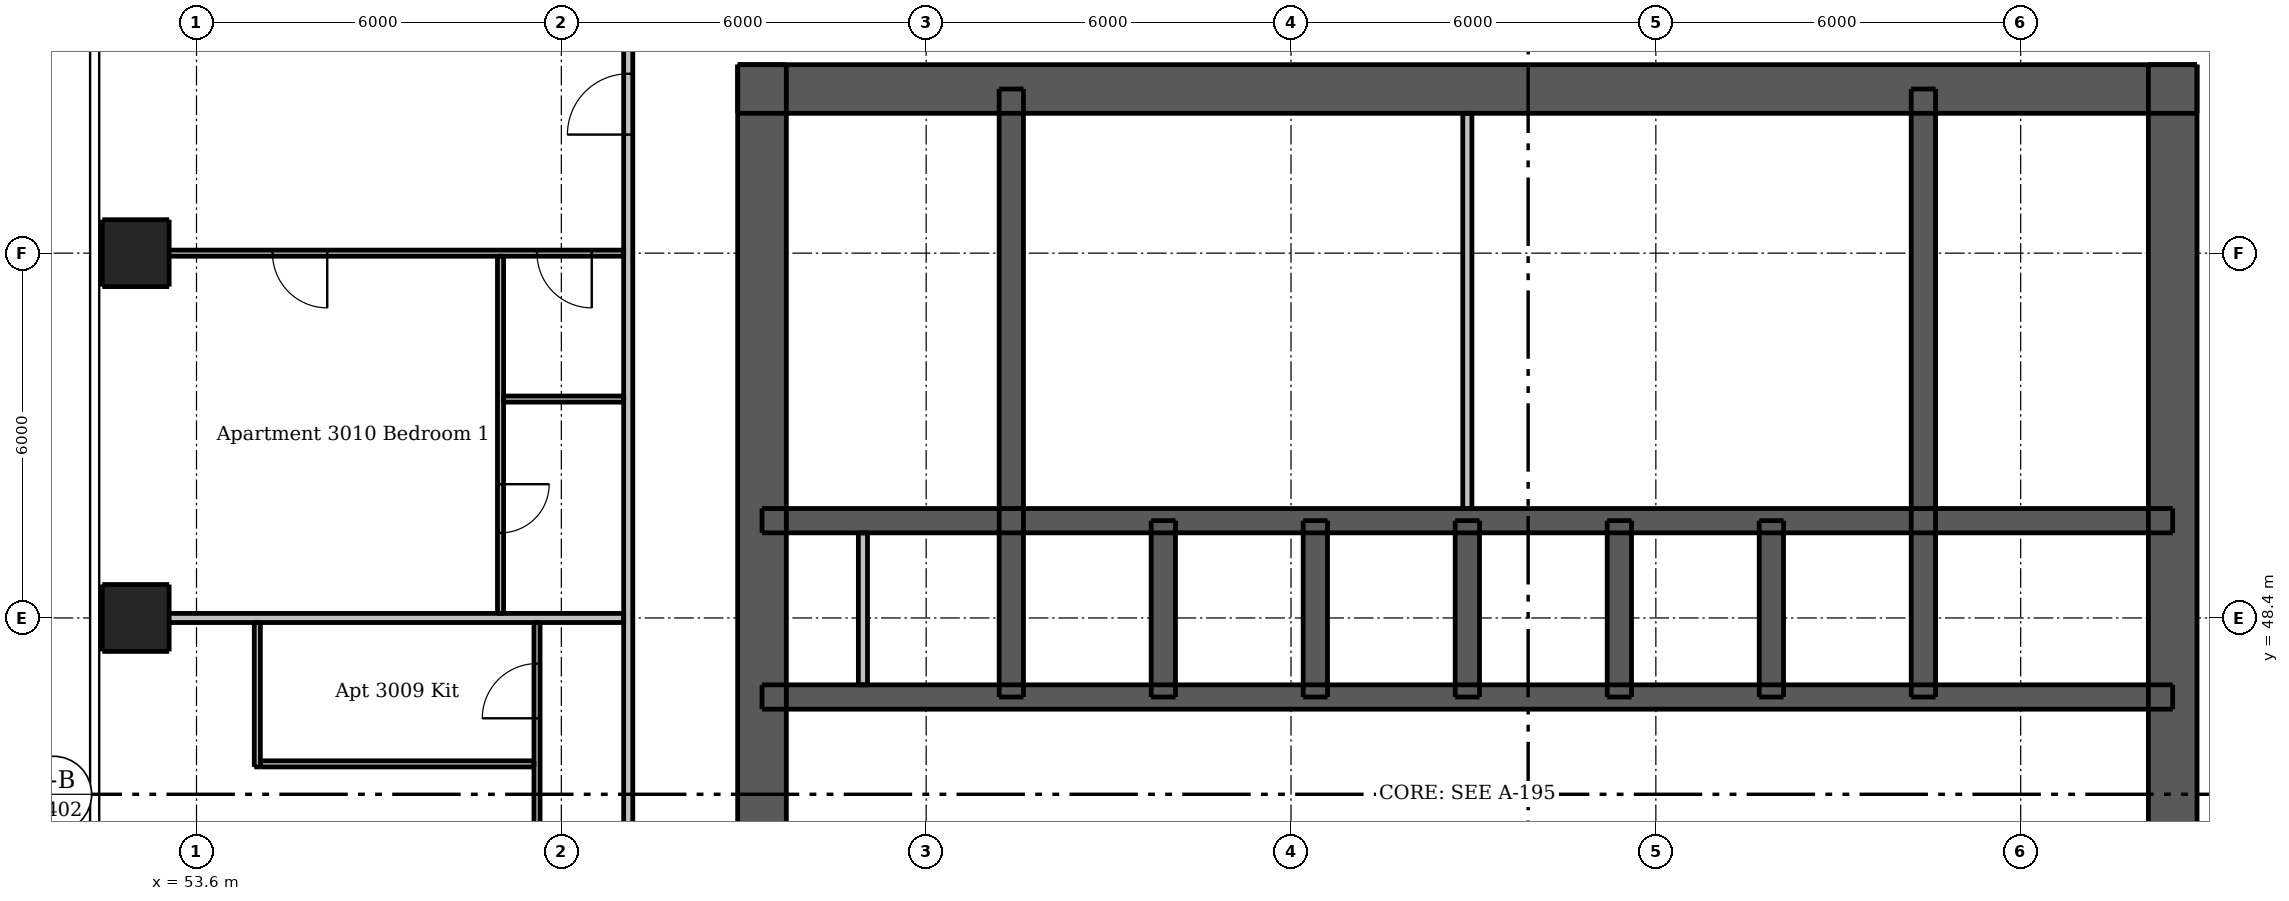
"""IFC4 building model, lengths in metres.
Left out: names, types, materials, properties, quantities, classifications, styles, units other than length and angle.
Written with IfcOpenShell. Run it as: python <this file> out.ifc"""

import sys

from ifc_helpers import new_model, si_unit, direction, frame, frame_2d, origin, origin_2d, place, context, subcontext, project, spatial, rectangle, extrude, element, fill, save


model = new_model("IFC4")
c1 = context("Model", 3, precision=1e-05, world=origin(), true_north=direction((0.0, 1.0)))
c2 = subcontext(c1, "Body", "Model", "MODEL_VIEW")
j1 = project(units=[si_unit("LENGTHUNIT", "METRE"), si_unit("PLANEANGLEUNIT", "RADIAN")], contexts=[c1])
p1 = place(None, origin())
s1 = spatial("IfcSite", under=j1, at=p1, CompositionType="ELEMENT")
p2 = place(p1, origin())
s2 = spatial("IfcBuilding", under=s1, at=p2, CompositionType="ELEMENT")
p3 = place(p2, frame((0.0, 0.0, 111.7)))
s3 = spatial("IfcBuildingStorey", under=s2, at=p3, CompositionType="ELEMENT", Elevation=111.7)
p4 = place(p3, frame((62.5, 57.1, 0.0), z_axis=(0.0, 0.0, 1.0), x_axis=(1.0, 0.0, 0.0)))
e1 = element("IfcWall", 1, at=p4, inside=s3, PredefinedType="SHEAR", context=c2, shape_type="SweptSolid", body=[
    extrude(rectangle(XDim=24.0, YDim=0.8, at=frame_2d((12.0, 0.0))), origin(), (0.0, 0.0, 1.0), 3.05),
])
p5 = place(p4, frame((20.9, 0.0, 0.0)))
e2 = element("IfcOpeningElement", 2, at=p5, cuts=e1, PredefinedType="OPENING", context=c2, shape_type="SweptSolid", body=[
    extrude(rectangle(XDim=1.1, YDim=2.1, at=frame_2d((0.55, 1.05))), frame((0.0, 0.41, 0.0), z_axis=(0.0, -1.0, 0.0), x_axis=(1.0, 0.0, 0.0)), (0.0, 0.0, 1.0), 0.82),
])
p6 = place(p4, frame((2.0, 0.0, 0.0)))
e3 = element("IfcOpeningElement", 3, at=p6, cuts=e1, PredefinedType="OPENING", context=c2, shape_type="SweptSolid", body=[
    extrude(rectangle(XDim=1.1, YDim=2.1, at=frame_2d((0.55, 1.05))), frame((0.0, 0.41, 0.0), z_axis=(0.0, -1.0, 0.0), x_axis=(1.0, 0.0, 0.0)), (0.0, 0.0, 1.0), 0.82),
])
p7 = place(p4, frame((7.9, 0.0, 0.0)))
e4 = element("IfcOpeningElement", 4, at=p7, cuts=e1, PredefinedType="OPENING", context=c2, shape_type="SweptSolid", body=[
    extrude(rectangle(XDim=0.9, YDim=2.1, at=frame_2d((0.45, 1.05))), frame((0.0, 0.41, 0.0), z_axis=(0.0, -1.0, 0.0), x_axis=(1.0, 0.0, 0.0)), (0.0, 0.0, 1.0), 0.82),
])
p8 = place(p4, frame((15.2, 0.0, 0.0)))
e5 = element("IfcOpeningElement", 5, at=p8, cuts=e1, PredefinedType="OPENING", context=c2, shape_type="SweptSolid", body=[
    extrude(rectangle(XDim=0.9, YDim=2.1, at=frame_2d((0.45, 1.05))), frame((0.0, 0.41, 0.0), z_axis=(0.0, -1.0, 0.0), x_axis=(1.0, 0.0, 0.0)), (0.0, 0.0, 1.0), 0.82),
])
p9 = place(p3, frame((62.9, 33.5, 0.0), z_axis=(0.0, 0.0, 1.0), x_axis=(0.0, 1.0, 0.0)))
e6 = element("IfcWall", 6, at=p9, inside=s3, PredefinedType="SHEAR", context=c2, shape_type="SweptSolid", body=[
    extrude(rectangle(XDim=24.0, YDim=0.8, at=frame_2d((12.0, 0.0))), origin(), (0.0, 0.0, 1.0), 3.05),
])
p10 = place(p9, frame((11.2, 0.0, 0.0)))
e7 = element("IfcOpeningElement", 7, at=p10, cuts=e6, PredefinedType="OPENING", context=c2, shape_type="SweptSolid", body=[
    extrude(rectangle(XDim=1.6, YDim=2.1, at=frame_2d((0.8, 1.05))), frame((0.0, 0.41, 0.0), z_axis=(0.0, -1.0, 0.0), x_axis=(1.0, 0.0, 0.0)), (0.0, 0.0, 1.0), 0.82),
])
p11 = place(p3, frame((86.1, 33.5, 0.0), z_axis=(0.0, 0.0, 1.0), x_axis=(0.0, 1.0, 0.0)))
e8 = element("IfcWall", 8, at=p11, inside=s3, PredefinedType="SHEAR", context=c2, shape_type="SweptSolid", body=[
    extrude(rectangle(XDim=24.0, YDim=0.8, at=frame_2d((12.0, 0.0))), origin(), (0.0, 0.0, 1.0), 3.05),
])
p12 = place(p11, frame((11.2, 0.0, 0.0)))
e9 = element("IfcOpeningElement", 9, at=p12, cuts=e8, PredefinedType="OPENING", context=c2, shape_type="SweptSolid", body=[
    extrude(rectangle(XDim=1.6, YDim=2.1, at=frame_2d((0.8, 1.05))), frame((0.0, 0.41, 0.0), z_axis=(0.0, -1.0, 0.0), x_axis=(1.0, 0.0, 0.0)), (0.0, 0.0, 1.0), 0.82),
])
p13 = place(p3, frame((62.9, 47.1, 0.0), z_axis=(0.0, 0.0, 1.0), x_axis=(1.0, 0.0, 0.0)))
e10 = element("IfcWall", 10, at=p13, inside=s3, PredefinedType="SHEAR", context=c2, shape_type="SweptSolid", body=[
    extrude(rectangle(XDim=23.2, YDim=0.4, at=frame_2d((11.6, 0.0))), origin(), (0.0, 0.0, 1.0), 3.05),
])
p14 = place(p13, frame((0.63, 0.0, 0.0)))
e11 = element("IfcOpeningElement", 11, at=p14, cuts=e10, PredefinedType="OPENING", context=c2, shape_type="SweptSolid", body=[
    extrude(rectangle(XDim=0.8, YDim=2.1, at=frame_2d((0.4, 1.05))), frame((0.0, 0.21, 0.0), z_axis=(0.0, -1.0, 0.0), x_axis=(1.0, 0.0, 0.0)), (0.0, 0.0, 1.0), 0.42),
])
p15 = place(p13, frame((2.33, 0.0, 0.0)))
e12 = element("IfcOpeningElement", 12, at=p15, cuts=e10, PredefinedType="OPENING", context=c2, shape_type="SweptSolid", body=[
    extrude(rectangle(XDim=0.9, YDim=2.1, at=frame_2d((0.45, 1.05))), frame((0.0, 0.21, 0.0), z_axis=(0.0, -1.0, 0.0), x_axis=(1.0, 0.0, 0.0)), (0.0, 0.0, 1.0), 0.42),
])
p16 = place(p13, frame((20.6, 0.0, 0.0)))
e13 = element("IfcOpeningElement", 13, at=p16, cuts=e10, PredefinedType="OPENING", context=c2, shape_type="SweptSolid", body=[
    extrude(rectangle(XDim=0.9, YDim=2.1, at=frame_2d((0.45, 1.05))), frame((0.0, 0.21, 0.0), z_axis=(0.0, -1.0, 0.0), x_axis=(1.0, 0.0, 0.0)), (0.0, 0.0, 1.0), 0.42),
])
p17 = place(p3, frame((62.9, 50.0, 0.0), z_axis=(0.0, 0.0, 1.0), x_axis=(1.0, 0.0, 0.0)))
e14 = element("IfcWall", 14, at=p17, inside=s3, PredefinedType="SHEAR", context=c2, shape_type="SweptSolid", body=[
    extrude(rectangle(XDim=23.2, YDim=0.4, at=frame_2d((11.6, 0.0))), origin(), (0.0, 0.0, 1.0), 3.05),
])
for number, where, z_axis, x_axis in (
    (15, (67.0, 47.1, 0.0), (0.0, 0.0, 1.0), (0.0, 1.0, 0.0)),
    (16, (82.0, 47.1, 0.0), (0.0, 0.0, 1.0), (0.0, 1.0, 0.0)),
):
    element("IfcWall", number, at=place(p3, frame(where, z_axis=z_axis, x_axis=x_axis)), inside=s3, PredefinedType="SHEAR", context=c2, shape_type="SweptSolid", body=[
        extrude(rectangle(XDim=10.0, YDim=0.4, at=frame_2d((5.0, 0.0))), origin(), (0.0, 0.0, 1.0), 3.05),
    ])
for number, where, z_axis, x_axis in (
    (17, (69.5, 47.1, 0.0), (0.0, 0.0, 1.0), (0.0, 1.0, 0.0)),
    (18, (72.0, 47.1, 0.0), (0.0, 0.0, 1.0), (0.0, 1.0, 0.0)),
    (19, (74.5, 47.1, 0.0), (0.0, 0.0, 1.0), (0.0, 1.0, 0.0)),
    (20, (77.0, 47.1, 0.0), (0.0, 0.0, 1.0), (0.0, 1.0, 0.0)),
    (21, (79.5, 47.1, 0.0), (0.0, 0.0, 1.0), (0.0, 1.0, 0.0)),
):
    element("IfcWall", number, at=place(p3, frame(where, z_axis=z_axis, x_axis=x_axis)), inside=s3, PredefinedType="SHEAR", context=c2, shape_type="SweptSolid", body=[
        extrude(rectangle(XDim=2.9, YDim=0.4, at=frame_2d((1.45, 0.0))), origin(), (0.0, 0.0, 1.0), 3.05),
    ])
for number, where, z_axis, x_axis in (
    (22, (52.6, 48.4, 0.0), (0.0, 0.0, 1.0), (1.0, 0.0, 0.0)),
    (23, (52.6, 54.4, 0.0), (0.0, 0.0, 1.0), (1.0, 0.0, 0.0)),
):
    element("IfcColumn", number, at=place(p3, frame(where, z_axis=z_axis, x_axis=x_axis)), inside=s3, PredefinedType="COLUMN", context=c2, shape_type="SweptSolid", body=[
        extrude(rectangle(XDim=1.1, YDim=1.1, at=origin_2d()), origin(), (0.0, 0.0, 1.0), 3.05),
    ])
p18 = place(p3, frame((64.56, 47.3, 0.0), z_axis=(0.0, 0.0, 1.0), x_axis=(0.0, 1.0, 0.0)))
e24 = element("IfcWall", 24, at=p18, inside=s3, PredefinedType="PLUMBINGWALL", context=c2, shape_type="SweptSolid", body=[
    extrude(rectangle(XDim=2.5, YDim=0.15, at=frame_2d((1.25, 0.0))), origin(), (0.0, 0.0, 1.0), 3.05),
])
p19 = place(p3, frame((74.5, 50.2, 0.0), z_axis=(0.0, 0.0, 1.0), x_axis=(0.0, 1.0, 0.0)))
e25 = element("IfcWall", 25, at=p19, inside=s3, PredefinedType="PLUMBINGWALL", context=c2, shape_type="SweptSolid", body=[
    extrude(rectangle(XDim=6.5, YDim=0.15, at=frame_2d((3.25, 0.0))), origin(), (0.0, 0.0, 1.0), 3.05),
])
p20 = place(p3, frame((54.6, 45.95, 0.0), z_axis=(0.0, 0.0, 1.0), x_axis=(0.0, 1.0, 0.0)))
e26 = element("IfcWall", 26, at=p20, inside=s3, PredefinedType="PARTITIONING", context=c2, shape_type="SweptSolid", body=[
    extrude(rectangle(XDim=2.375, YDim=0.1, at=frame_2d((1.188, 0.0))), origin(), (0.0, 0.0, 1.0), 3.05),
])
p21 = place(p3, frame((58.6, 54.35, 0.0), z_axis=(0.0, 0.0, 1.0), x_axis=(0.0, -1.0, 0.0)))
e27 = element("IfcWall", 27, at=p21, inside=s3, PredefinedType="PARTITIONING", context=c2, shape_type="SweptSolid", body=[
    extrude(rectangle(XDim=5.875, YDim=0.1, at=frame_2d((2.938, 0.0))), origin(), (0.0, 0.0, 1.0), 3.05),
])
p22 = place(p21, frame((3.75, 0.0, 0.0)))
e28 = element("IfcOpeningElement", 28, at=p22, cuts=e27, PredefinedType="OPENING", context=c2, shape_type="SweptSolid", body=[
    extrude(rectangle(XDim=0.8, YDim=2.1, at=frame_2d((0.4, 1.05))), frame((0.0, 0.06, 0.0), z_axis=(0.0, -1.0, 0.0), x_axis=(1.0, 0.0, 0.0)), (0.0, 0.0, 1.0), 0.12),
])
p23 = place(p3, frame((59.2, 31.65, 0.0), z_axis=(0.0, 0.0, 1.0), x_axis=(0.0, 1.0, 0.0)))
e29 = element("IfcWall", 29, at=p23, inside=s3, PredefinedType="PARTITIONING", context=c2, shape_type="SweptSolid", body=[
    extrude(rectangle(XDim=16.675, YDim=0.1, at=frame_2d((8.337, 0.0))), origin(), (0.0, 0.0, 1.0), 3.05),
])
p24 = place(p23, frame((12.1, 0.0, 0.0)))
e30 = element("IfcOpeningElement", 30, at=p24, cuts=e29, PredefinedType="OPENING", context=c2, shape_type="SweptSolid", body=[
    extrude(rectangle(XDim=0.9, YDim=2.1, at=frame_2d((0.45, 1.05))), frame((0.0, 0.06, 0.0), z_axis=(0.0, -1.0, 0.0), x_axis=(1.0, 0.0, 0.0)), (0.0, 0.0, 1.0), 0.12),
])
p25 = place(p23, frame((15.1, 0.0, 0.0)))
e31 = element("IfcOpeningElement", 31, at=p25, cuts=e29, PredefinedType="OPENING", context=c2, shape_type="SweptSolid", body=[
    extrude(rectangle(XDim=0.9, YDim=2.1, at=frame_2d((0.45, 1.05))), frame((0.0, 0.06, 0.0), z_axis=(0.0, -1.0, 0.0), x_axis=(1.0, 0.0, 0.0)), (0.0, 0.0, 1.0), 0.12),
])
p26 = place(p23, frame((0.75, 0.0, 0.0)))
e32 = element("IfcOpeningElement", 32, at=p26, cuts=e29, PredefinedType="OPENING", context=c2, shape_type="SweptSolid", body=[
    extrude(rectangle(XDim=0.9, YDim=2.1, at=frame_2d((0.45, 1.05))), frame((0.0, 0.06, 0.0), z_axis=(0.0, -1.0, 0.0), x_axis=(1.0, 0.0, 0.0)), (0.0, 0.0, 1.0), 0.12),
])
p27 = place(p23, frame((6.1, 0.0, 0.0)))
e33 = element("IfcOpeningElement", 33, at=p27, cuts=e29, PredefinedType="OPENING", context=c2, shape_type="SweptSolid", body=[
    extrude(rectangle(XDim=0.9, YDim=2.1, at=frame_2d((0.45, 1.05))), frame((0.0, 0.06, 0.0), z_axis=(0.0, -1.0, 0.0), x_axis=(1.0, 0.0, 0.0)), (0.0, 0.0, 1.0), 0.12),
])
p28 = place(p23, frame((3.15, 0.0, 0.0)))
e34 = element("IfcOpeningElement", 34, at=p28, cuts=e29, PredefinedType="OPENING", context=c2, shape_type="SweptSolid", body=[
    extrude(rectangle(XDim=0.8, YDim=2.1, at=frame_2d((0.4, 1.05))), frame((0.0, 0.06, 0.0), z_axis=(0.0, -1.0, 0.0), x_axis=(1.0, 0.0, 0.0)), (0.0, 0.0, 1.0), 0.12),
])
p29 = place(p23, frame((9.15, 0.0, 0.0)))
e35 = element("IfcOpeningElement", 35, at=p29, cuts=e29, PredefinedType="OPENING", context=c2, shape_type="SweptSolid", body=[
    extrude(rectangle(XDim=0.8, YDim=2.1, at=frame_2d((0.4, 1.05))), frame((0.0, 0.06, 0.0), z_axis=(0.0, -1.0, 0.0), x_axis=(1.0, 0.0, 0.0)), (0.0, 0.0, 1.0), 0.12),
])
p30 = place(p3, frame((60.625, 54.4, 0.0), z_axis=(0.0, 0.0, 1.0), x_axis=(-1.0, 0.0, 0.0)))
e36 = element("IfcWall", 36, at=p30, inside=s3, PredefinedType="PARTITIONING", context=c2, shape_type="SweptSolid", body=[
    extrude(rectangle(XDim=8.625, YDim=0.1, at=frame_2d((4.312, 0.0))), origin(), (0.0, 0.0, 1.0), 2.516),
])
p31 = place(p30, frame((0.525, 0.0, 0.0)))
e37 = element("IfcOpeningElement", 37, at=p31, cuts=e36, PredefinedType="OPENING", context=c2, shape_type="SweptSolid", body=[
    extrude(rectangle(XDim=0.9, YDim=2.1, at=frame_2d((0.45, 1.05))), frame((0.0, 0.06, 0.0), z_axis=(0.0, -1.0, 0.0), x_axis=(1.0, 0.0, 0.0)), (0.0, 0.0, 1.0), 0.12),
])
p32 = place(p30, frame((4.875, 0.0, 0.0)))
e38 = element("IfcOpeningElement", 38, at=p32, cuts=e36, PredefinedType="OPENING", context=c2, shape_type="SweptSolid", body=[
    extrude(rectangle(XDim=0.9, YDim=2.1, at=frame_2d((0.45, 1.05))), frame((0.0, 0.06, 0.0), z_axis=(0.0, -1.0, 0.0), x_axis=(1.0, 0.0, 0.0)), (0.0, 0.0, 1.0), 0.12),
])
p33 = place(p3, frame((58.65, 52.0, 0.0), z_axis=(0.0, 0.0, 1.0), x_axis=(1.0, 0.0, 0.0)))
e39 = element("IfcWall", 39, at=p33, inside=s3, PredefinedType="PARTITIONING", context=c2, shape_type="SweptSolid", body=[
    extrude(rectangle(XDim=1.975, YDim=0.1, at=frame_2d((0.988, 0.0))), origin(), (0.0, 0.0, 1.0), 3.05),
])
p34 = place(p3, frame((54.65, 46.0, 0.0), z_axis=(0.0, 0.0, 1.0), x_axis=(1.0, 0.0, 0.0)))
e40 = element("IfcWall", 40, at=p34, inside=s3, PredefinedType="PARTITIONING", context=c2, shape_type="SweptSolid", body=[
    extrude(rectangle(XDim=4.5, YDim=0.1, at=frame_2d((2.25, 0.0))), origin(), (0.0, 0.0, 1.0), 3.05),
])
p35 = place(p3, frame((60.7, 30.325, 0.0), z_axis=(0.0, 0.0, 1.0), x_axis=(0.0, 1.0, 0.0)))
e41 = element("IfcWall", 41, at=p35, inside=s3, PredefinedType="PARTITIONING", context=c2, shape_type="SweptSolid", body=[
    extrude(rectangle(XDim=28.9, YDim=0.15, at=frame_2d((14.45, 0.0))), origin(), (0.0, 0.0, 1.0), 3.05),
])
p36 = place(p35, frame((9.225, 0.0, 0.0)))
e42 = element("IfcOpeningElement", 42, at=p36, cuts=e41, PredefinedType="OPENING", context=c2, shape_type="SweptSolid", body=[
    extrude(rectangle(XDim=1.0, YDim=2.1, at=frame_2d((0.5, 1.05))), frame((0.0, 0.085, 0.0), z_axis=(0.0, -1.0, 0.0), x_axis=(1.0, 0.0, 0.0)), (0.0, 0.0, 1.0), 0.17),
])
p37 = place(p35, frame((26.025, 0.0, 0.0)))
e43 = element("IfcOpeningElement", 43, at=p37, cuts=e41, PredefinedType="OPENING", context=c2, shape_type="SweptSolid", body=[
    extrude(rectangle(XDim=1.0, YDim=2.1, at=frame_2d((0.5, 1.05))), frame((0.0, 0.085, 0.0), z_axis=(0.0, -1.0, 0.0), x_axis=(1.0, 0.0, 0.0)), (0.0, 0.0, 1.0), 0.17),
])
p38 = place(p3, frame((52.0, 48.4, 0.0), z_axis=(0.0, 0.0, 1.0), x_axis=(1.0, 0.0, 0.0)))
e44 = element("IfcWall", 44, at=p38, inside=s3, PredefinedType="PARTITIONING", context=c2, shape_type="SweptSolid", body=[
    extrude(rectangle(XDim=8.625, YDim=0.15, at=frame_2d((4.312, 0.0))), origin(), (0.0, 0.0, 1.0), 2.516),
])
p39 = place(p5, origin())
e45 = element("IfcDoor", 45, at=p39, inside=s3, OperationType="SINGLE_SWING_RIGHT", PredefinedType="DOOR", context=c2, shape_type="SweptSolid", body=[
    extrude(rectangle(XDim=1.1, YDim=2.1, at=frame_2d((0.55, 1.05))), frame((0.0, -0.337, 0.0), z_axis=(0.0, -1.0, 0.0), x_axis=(1.0, 0.0, 0.0)), (0.0, 0.0, 1.0), 0.05),
])
fill(e2, e45)
p40 = place(p6, origin())
e46 = element("IfcDoor", 46, at=p40, inside=s3, OperationType="SINGLE_SWING_LEFT", PredefinedType="DOOR", context=c2, shape_type="SweptSolid", body=[
    extrude(rectangle(XDim=1.1, YDim=2.1, at=frame_2d((0.55, 1.05))), frame((0.0, -0.337, 0.0), z_axis=(0.0, -1.0, 0.0), x_axis=(1.0, 0.0, 0.0)), (0.0, 0.0, 1.0), 0.05),
])
fill(e3, e46)
p41 = place(p10, origin())
e47 = element("IfcDoor", 47, at=p41, inside=s3, OperationType="DOUBLE_DOOR_SINGLE_SWING", PredefinedType="DOOR", context=c2, shape_type="SweptSolid", body=[
    extrude(rectangle(XDim=1.6, YDim=2.1, at=frame_2d((0.8, 1.05))), frame((0.0, -0.337, 0.0), z_axis=(0.0, -1.0, 0.0), x_axis=(1.0, 0.0, 0.0)), (0.0, 0.0, 1.0), 0.05),
])
fill(e7, e47)
p42 = place(p12, origin())
e48 = element("IfcDoor", 48, at=p42, inside=s3, OperationType="DOUBLE_DOOR_SINGLE_SWING", PredefinedType="DOOR", context=c2, shape_type="SweptSolid", body=[
    extrude(rectangle(XDim=1.6, YDim=2.1, at=frame_2d((0.8, 1.05))), frame((0.0, 0.388, 0.0), z_axis=(0.0, -1.0, 0.0), x_axis=(1.0, 0.0, 0.0)), (0.0, 0.0, 1.0), 0.05),
])
fill(e9, e48)
p43 = place(p14, origin())
e49 = element("IfcDoor", 49, at=p43, inside=s3, OperationType="SINGLE_SWING_LEFT", PredefinedType="DOOR", context=c2, shape_type="SweptSolid", body=[
    extrude(rectangle(XDim=0.8, YDim=2.1, at=frame_2d((0.4, 1.05))), frame((0.0, 0.188, 0.0), z_axis=(0.0, -1.0, 0.0), x_axis=(1.0, 0.0, 0.0)), (0.0, 0.0, 1.0), 0.05),
])
fill(e11, e49)
p44 = place(p15, origin())
e50 = element("IfcDoor", 50, at=p44, inside=s3, OperationType="SINGLE_SWING_RIGHT", PredefinedType="DOOR", context=c2, shape_type="SweptSolid", body=[
    extrude(rectangle(XDim=0.9, YDim=2.1, at=frame_2d((0.45, 1.05))), frame((0.0, 0.188, 0.0), z_axis=(0.0, -1.0, 0.0), x_axis=(1.0, 0.0, 0.0)), (0.0, 0.0, 1.0), 0.05),
])
fill(e12, e50)
p45 = place(p16, origin())
e51 = element("IfcDoor", 51, at=p45, inside=s3, OperationType="SINGLE_SWING_LEFT", PredefinedType="DOOR", context=c2, shape_type="SweptSolid", body=[
    extrude(rectangle(XDim=0.9, YDim=2.1, at=frame_2d((0.45, 1.05))), frame((0.0, 0.188, 0.0), z_axis=(0.0, -1.0, 0.0), x_axis=(1.0, 0.0, 0.0)), (0.0, 0.0, 1.0), 0.05),
])
fill(e13, e51)
p46 = place(p7, origin())
e52 = element("IfcDoor", 52, at=p46, inside=s3, OperationType="SINGLE_SWING_RIGHT", PredefinedType="DOOR", context=c2, shape_type="SweptSolid", body=[
    extrude(rectangle(XDim=0.9, YDim=2.1, at=frame_2d((0.45, 1.05))), frame((0.0, -0.337, 0.0), z_axis=(0.0, -1.0, 0.0), x_axis=(1.0, 0.0, 0.0)), (0.0, 0.0, 1.0), 0.05),
])
fill(e4, e52)
p47 = place(p8, origin())
e53 = element("IfcDoor", 53, at=p47, inside=s3, OperationType="SINGLE_SWING_RIGHT", PredefinedType="DOOR", context=c2, shape_type="SweptSolid", body=[
    extrude(rectangle(XDim=0.9, YDim=2.1, at=frame_2d((0.45, 1.05))), frame((0.0, -0.337, 0.0), z_axis=(0.0, -1.0, 0.0), x_axis=(1.0, 0.0, 0.0)), (0.0, 0.0, 1.0), 0.05),
])
fill(e5, e53)
p48 = place(p25, origin())
e54 = element("IfcDoor", 54, at=p48, inside=s3, OperationType="SINGLE_SWING_LEFT", PredefinedType="DOOR", context=c2, shape_type="SweptSolid", body=[
    extrude(rectangle(XDim=0.9, YDim=2.1, at=frame_2d((0.45, 1.05))), frame((0.0, 0.025, 0.0), z_axis=(0.0, -1.0, 0.0), x_axis=(1.0, 0.0, 0.0)), (0.0, 0.0, 1.0), 0.05),
])
fill(e31, e54)
p49 = place(p37, origin())
e55 = element("IfcDoor", 55, at=p49, inside=s3, OperationType="SINGLE_SWING_LEFT", PredefinedType="DOOR", context=c2, shape_type="SweptSolid", body=[
    extrude(rectangle(XDim=1.0, YDim=2.1, at=frame_2d((0.5, 1.05))), frame((0.0, 0.025, 0.0), z_axis=(0.0, -1.0, 0.0), x_axis=(1.0, 0.0, 0.0)), (0.0, 0.0, 1.0), 0.05),
])
fill(e43, e55)
p50 = place(p31, origin())
e56 = element("IfcDoor", 56, at=p50, inside=s3, OperationType="SINGLE_SWING_LEFT", PredefinedType="DOOR", context=c2, shape_type="SweptSolid", body=[
    extrude(rectangle(XDim=0.9, YDim=2.1, at=frame_2d((0.45, 1.05))), frame((0.0, 0.025, 0.0), z_axis=(0.0, -1.0, 0.0), x_axis=(1.0, 0.0, 0.0)), (0.0, 0.0, 1.0), 0.05),
])
fill(e37, e56)
p51 = place(p32, origin())
e57 = element("IfcDoor", 57, at=p51, inside=s3, OperationType="SINGLE_SWING_LEFT", PredefinedType="DOOR", context=c2, shape_type="SweptSolid", body=[
    extrude(rectangle(XDim=0.9, YDim=2.1, at=frame_2d((0.45, 1.05))), frame((0.0, 0.025, 0.0), z_axis=(0.0, -1.0, 0.0), x_axis=(1.0, 0.0, 0.0)), (0.0, 0.0, 1.0), 0.05),
])
fill(e38, e57)
p52 = place(p22, origin())
e58 = element("IfcDoor", 58, at=p52, inside=s3, OperationType="SINGLE_SWING_LEFT", PredefinedType="DOOR", context=c2, shape_type="SweptSolid", body=[
    extrude(rectangle(XDim=0.8, YDim=2.1, at=frame_2d((0.4, 1.05))), frame((0.0, 0.025, 0.0), z_axis=(0.0, -1.0, 0.0), x_axis=(1.0, 0.0, 0.0)), (0.0, 0.0, 1.0), 0.05),
])
fill(e28, e58)
save(model, sys.argv[1])
